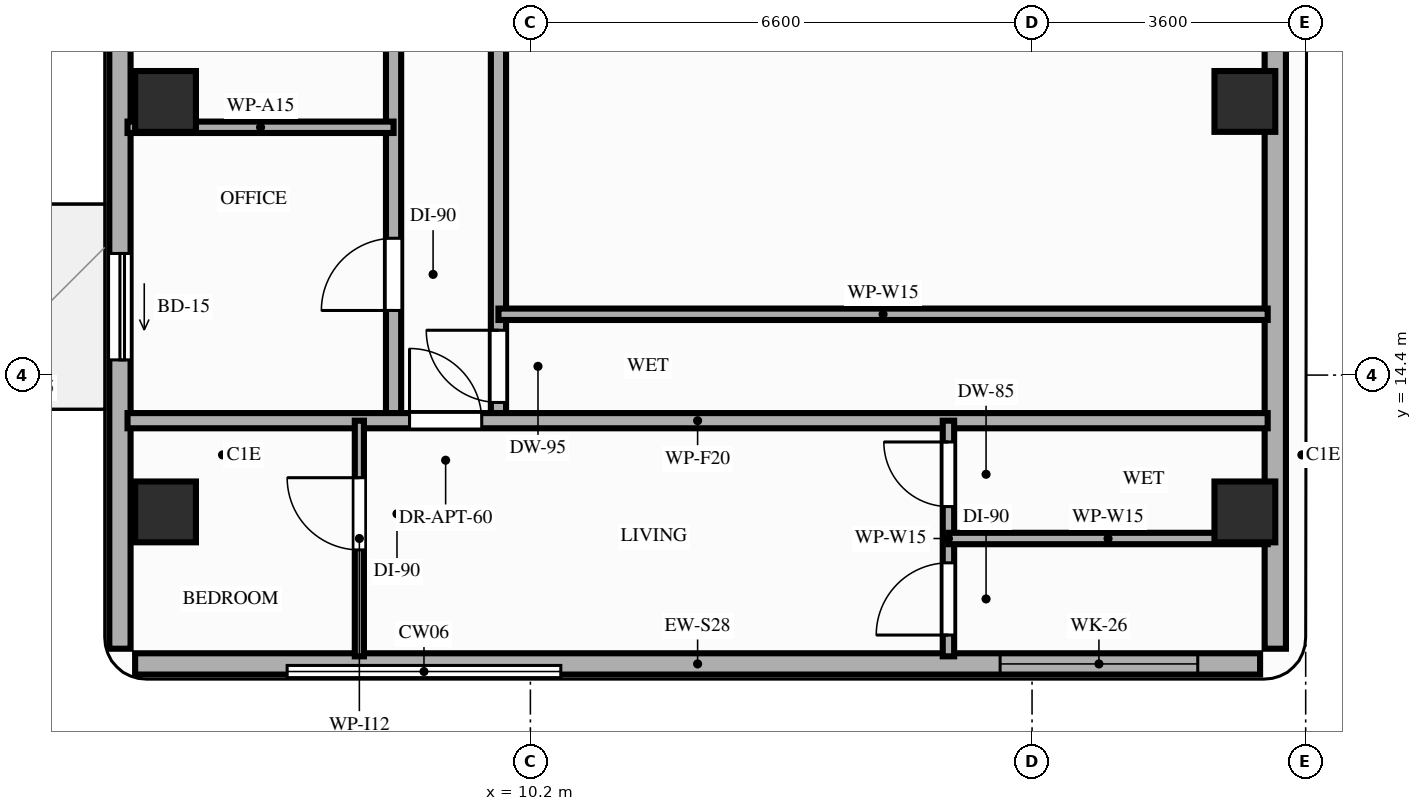
"""IFC4 building model, lengths in metres.
Left out: names, types, materials, properties, quantities, classifications, styles, units other than length and angle.
Written with IfcOpenShell. Run it as: python <this file> out.ifc"""

import sys

from ifc_helpers import new_model, si_unit, direction, frame, frame_2d, origin, origin_2d, place, context, subcontext, project, spatial, rectangle, extrude, element, fill, save


model = new_model("IFC4")
c1 = context("Model", 3, precision=1e-05, world=origin(), true_north=direction((0.0, 1.0)))
c2 = subcontext(c1, "Body", "Model", "MODEL_VIEW")
j1 = project(units=[si_unit("LENGTHUNIT", "METRE"), si_unit("PLANEANGLEUNIT", "RADIAN")], contexts=[c1])
p1 = place(None, origin())
s1 = spatial("IfcSite", under=j1, at=p1, CompositionType="ELEMENT")
p2 = place(p1, origin())
s2 = spatial("IfcBuilding", under=s1, at=p2, CompositionType="ELEMENT")
p3 = place(p2, frame((0.0, 0.0, 244.0)))
s3 = spatial("IfcBuildingStorey", under=s2, at=p3, CompositionType="ELEMENT", Elevation=244.0)
for number, where, z_axis, x_axis in (
    (1, (5.4, 12.6, 0.0), (0.0, 0.0, 1.0), (1.0, 0.0, 0.0)),
    (2, (19.6, 12.6, 0.0), (0.0, 0.0, 1.0), (1.0, 0.0, 0.0)),
    (3, (5.4, 18.0, 0.0), (0.0, 0.0, 1.0), (1.0, 0.0, 0.0)),
    (4, (19.6, 18.0, 0.0), (0.0, 0.0, 1.0), (1.0, 0.0, 0.0)),
):
    element("IfcColumn", number, at=place(p3, frame(where, z_axis=z_axis, x_axis=x_axis)), inside=s3, PredefinedType="COLUMN", context=c2, shape_type="SweptSolid", body=[
        extrude(rectangle(XDim=0.8, YDim=0.8, at=origin_2d()), origin(), (0.0, 0.0, 1.0), 3.2),
    ])
p4 = place(p3, frame((5.0, 10.6, 0.0), z_axis=(0.0, 0.0, 1.0), x_axis=(1.0, 0.0, 0.0)))
e5 = element("IfcWall", 5, at=p4, inside=s3, PredefinedType="STANDARD", context=c2, shape_type="SweptSolid", body=[
    extrude(rectangle(XDim=14.8, YDim=0.28, at=frame_2d((7.4, 0.0))), origin(), (0.0, 0.0, 1.0), 3.02),
])
p5 = place(p4, frame((11.38, 0.0, 0.85)))
e6 = element("IfcOpeningElement", 6, at=p5, cuts=e5, PredefinedType="OPENING", context=c2, shape_type="SweptSolid", body=[
    extrude(rectangle(XDim=2.6, YDim=1.92, at=frame_2d((1.3, 0.96))), frame((0.0, 0.15, 0.0), z_axis=(0.0, -1.0, 0.0), x_axis=(1.0, 0.0, 0.0)), (0.0, 0.0, 1.0), 0.3),
])
p6 = place(p3, frame((4.8, 42.1, 0.0), z_axis=(0.0, 0.0, 1.0), x_axis=(0.0, -1.0, 0.0)))
e7 = element("IfcWall", 7, at=p6, inside=s3, PredefinedType="STANDARD", context=c2, shape_type="SweptSolid", body=[
    extrude(rectangle(XDim=31.3, YDim=0.28, at=frame_2d((15.65, 0.0))), origin(), (0.0, 0.0, 1.0), 2.71),
])
p7 = place(p6, frame((26.1, 0.0, 0.0)))
e8 = element("IfcOpeningElement", 8, at=p7, cuts=e7, PredefinedType="OPENING", context=c2, shape_type="SweptSolid", body=[
    extrude(rectangle(XDim=1.4, YDim=2.1, at=frame_2d((0.7, 1.05))), frame((0.0, 0.15, 0.0), z_axis=(0.0, -1.0, 0.0), x_axis=(1.0, 0.0, 0.0)), (0.0, 0.0, 1.0), 0.3),
])
p8 = place(p6, frame((20.1, 0.0, 0.85)))
e9 = element("IfcOpeningElement", 9, at=p8, cuts=e7, PredefinedType="OPENING", context=c2, shape_type="SweptSolid", body=[
    extrude(rectangle(XDim=2.6, YDim=1.61, at=frame_2d((1.3, 0.805))), frame((0.0, 0.15, 0.0), z_axis=(0.0, -1.0, 0.0), x_axis=(1.0, 0.0, 0.0)), (0.0, 0.0, 1.0), 0.3),
])
p9 = place(p6, frame((9.5, 0.0, 0.85)))
e10 = element("IfcOpeningElement", 10, at=p9, cuts=e7, PredefinedType="OPENING", context=c2, shape_type="SweptSolid", body=[
    extrude(rectangle(XDim=2.6, YDim=1.61, at=frame_2d((1.3, 0.805))), frame((0.0, 0.15, 0.0), z_axis=(0.0, -1.0, 0.0), x_axis=(1.0, 0.0, 0.0)), (0.0, 0.0, 1.0), 0.3),
])
p10 = place(p6, frame((3.4, 0.0, 0.85)))
e11 = element("IfcOpeningElement", 11, at=p10, cuts=e7, PredefinedType="OPENING", context=c2, shape_type="SweptSolid", body=[
    extrude(rectangle(XDim=2.6, YDim=1.61, at=frame_2d((1.3, 0.805))), frame((0.0, 0.15, 0.0), z_axis=(0.0, -1.0, 0.0), x_axis=(1.0, 0.0, 0.0)), (0.0, 0.0, 1.0), 0.3),
])
p11 = place(p3, frame((20.0, 10.8, 0.0), z_axis=(0.0, 0.0, 1.0), x_axis=(0.0, 1.0, 0.0)))
e12 = element("IfcWall", 12, at=p11, inside=s3, PredefinedType="STANDARD", context=c2, shape_type="SweptSolid", body=[
    extrude(rectangle(XDim=21.55, YDim=0.28, at=frame_2d((10.775, 0.0))), origin(), (0.0, 0.0, 1.0), 2.56),
])
p12 = place(p11, frame((8.6, 0.0, 0.85)))
e13 = element("IfcOpeningElement", 13, at=p12, cuts=e12, PredefinedType="OPENING", context=c2, shape_type="SweptSolid", body=[
    extrude(rectangle(XDim=2.6, YDim=1.46, at=frame_2d((1.3, 0.73))), frame((0.0, 0.15, 0.0), z_axis=(0.0, -1.0, 0.0), x_axis=(1.0, 0.0, 0.0)), (0.0, 0.0, 1.0), 0.3),
])
p13 = place(p3, frame((8.4, 13.8, 0.0), z_axis=(0.0, 0.0, 1.0), x_axis=(0.0, 1.0, 0.0)))
e14 = element("IfcWall", 14, at=p13, inside=s3, PredefinedType="PARTITIONING", context=c2, shape_type="SweptSolid", body=[
    extrude(rectangle(XDim=14.3, YDim=0.2, at=frame_2d((7.15, 0.0))), origin(), (0.0, 0.0, 1.0), 2.56),
])
p14 = place(p13, frame((1.45, 0.0, 0.0)))
e15 = element("IfcOpeningElement", 15, at=p14, cuts=e14, PredefinedType="OPENING", context=c2, shape_type="SweptSolid", body=[
    extrude(rectangle(XDim=0.95, YDim=2.15, at=frame_2d((0.475, 1.075))), frame((0.0, 0.11, 0.0), z_axis=(0.0, -1.0, 0.0), x_axis=(1.0, 0.0, 0.0)), (0.0, 0.0, 1.0), 0.22),
])
p15 = place(p13, frame((5.81, 0.0, 0.0)))
e16 = element("IfcOpeningElement", 16, at=p15, cuts=e14, PredefinedType="OPENING", context=c2, shape_type="SweptSolid", body=[
    extrude(rectangle(XDim=0.95, YDim=2.15, at=frame_2d((0.475, 1.075))), frame((0.0, 0.11, 0.0), z_axis=(0.0, -1.0, 0.0), x_axis=(1.0, 0.0, 0.0)), (0.0, 0.0, 1.0), 0.22),
])
p16 = place(p13, frame((11.03, 0.0, 0.0)))
e17 = element("IfcOpeningElement", 17, at=p16, cuts=e14, PredefinedType="OPENING", context=c2, shape_type="SweptSolid", body=[
    extrude(rectangle(XDim=0.95, YDim=2.15, at=frame_2d((0.475, 1.075))), frame((0.0, 0.11, 0.0), z_axis=(0.0, -1.0, 0.0), x_axis=(1.0, 0.0, 0.0)), (0.0, 0.0, 1.0), 0.22),
])
p17 = place(p3, frame((9.78, 13.8, 0.0), z_axis=(0.0, 0.0, 1.0), x_axis=(0.0, 1.0, 0.0)))
e18 = element("IfcWall", 18, at=p17, inside=s3, PredefinedType="PARTITIONING", context=c2, shape_type="SweptSolid", body=[
    extrude(rectangle(XDim=14.3, YDim=0.2, at=frame_2d((7.15, 0.0))), origin(), (0.0, 0.0, 1.0), 2.56),
])
p18 = place(p17, frame((0.24, 0.0, 0.0)))
e19 = element("IfcOpeningElement", 19, at=p18, cuts=e18, PredefinedType="OPENING", context=c2, shape_type="SweptSolid", body=[
    extrude(rectangle(XDim=0.95, YDim=2.1, at=frame_2d((0.475, 1.05))), frame((0.0, 0.11, 0.0), z_axis=(0.0, -1.0, 0.0), x_axis=(1.0, 0.0, 0.0)), (0.0, 0.0, 1.0), 0.22),
])
p19 = place(p17, frame((4.98, 0.0, 0.0)))
e20 = element("IfcOpeningElement", 20, at=p19, cuts=e18, PredefinedType="OPENING", context=c2, shape_type="SweptSolid", body=[
    extrude(rectangle(XDim=0.95, YDim=2.15, at=frame_2d((0.475, 1.075))), frame((0.0, 0.11, 0.0), z_axis=(0.0, -1.0, 0.0), x_axis=(1.0, 0.0, 0.0)), (0.0, 0.0, 1.0), 0.22),
])
p20 = place(p17, frame((11.43, 0.0, 0.0)))
e21 = element("IfcOpeningElement", 21, at=p20, cuts=e18, PredefinedType="OPENING", context=c2, shape_type="SweptSolid", body=[
    extrude(rectangle(XDim=0.95, YDim=2.15, at=frame_2d((0.475, 1.075))), frame((0.0, 0.11, 0.0), z_axis=(0.0, -1.0, 0.0), x_axis=(1.0, 0.0, 0.0)), (0.0, 0.0, 1.0), 0.22),
])
p21 = place(p3, frame((4.9, 13.8, 0.0), z_axis=(0.0, 0.0, 1.0), x_axis=(1.0, 0.0, 0.0)))
e22 = element("IfcWall", 22, at=p21, inside=s3, PredefinedType="PARTITIONING", context=c2, shape_type="SweptSolid", body=[
    extrude(rectangle(XDim=15.0, YDim=0.2, at=frame_2d((7.5, 0.0))), origin(), (0.0, 0.0, 1.0), 2.56),
])
p22 = place(p21, frame((3.71, 0.0, 0.0)))
e23 = element("IfcOpeningElement", 23, at=p22, cuts=e22, PredefinedType="OPENING", context=c2, shape_type="SweptSolid", body=[
    extrude(rectangle(XDim=0.95, YDim=2.15, at=frame_2d((0.475, 1.075))), frame((0.0, 0.11, 0.0), z_axis=(0.0, -1.0, 0.0), x_axis=(1.0, 0.0, 0.0)), (0.0, 0.0, 1.0), 0.22),
])
p23 = place(p3, frame((7.95, 10.7, 0.0), z_axis=(0.0, 0.0, 1.0), x_axis=(0.0, 1.0, 0.0)))
e24 = element("IfcWall", 24, at=p23, inside=s3, PredefinedType="PARTITIONING", context=c2, shape_type="SweptSolid", body=[
    extrude(rectangle(XDim=3.1, YDim=0.12, at=frame_2d((1.55, 0.0))), origin(), (0.0, 0.0, 1.0), 2.56),
])
p24 = place(p23, frame((1.4, 0.0, 0.0)))
e25 = element("IfcOpeningElement", 25, at=p24, cuts=e24, PredefinedType="OPENING", context=c2, shape_type="SweptSolid", body=[
    extrude(rectangle(XDim=0.95, YDim=2.15, at=frame_2d((0.475, 1.075))), frame((0.0, 0.07, 0.0), z_axis=(0.0, -1.0, 0.0), x_axis=(1.0, 0.0, 0.0)), (0.0, 0.0, 1.0), 0.14),
])
p25 = place(p3, frame((15.7, 10.7, 0.0), z_axis=(0.0, 0.0, 1.0), x_axis=(0.0, 1.0, 0.0)))
e26 = element("IfcWall", 26, at=p25, inside=s3, PredefinedType="PARTITIONING", context=c2, shape_type="SweptSolid", body=[
    extrude(rectangle(XDim=3.1, YDim=0.15, at=frame_2d((1.55, 0.0))), origin(), (0.0, 0.0, 1.0), 2.56),
])
p26 = place(p25, frame((0.28, 0.0, 0.0)))
e27 = element("IfcOpeningElement", 27, at=p26, cuts=e26, PredefinedType="OPENING", context=c2, shape_type="SweptSolid", body=[
    extrude(rectangle(XDim=0.95, YDim=2.15, at=frame_2d((0.475, 1.075))), frame((0.0, 0.085, 0.0), z_axis=(0.0, -1.0, 0.0), x_axis=(1.0, 0.0, 0.0)), (0.0, 0.0, 1.0), 0.17),
])
p27 = place(p25, frame((1.97, 0.0, 0.0)))
e28 = element("IfcOpeningElement", 28, at=p27, cuts=e26, PredefinedType="OPENING", context=c2, shape_type="SweptSolid", body=[
    extrude(rectangle(XDim=0.85, YDim=2.1, at=frame_2d((0.425, 1.05))), frame((0.0, 0.085, 0.0), z_axis=(0.0, -1.0, 0.0), x_axis=(1.0, 0.0, 0.0)), (0.0, 0.0, 1.0), 0.17),
])
p28 = place(p3, frame((15.7, 12.25, 0.0), z_axis=(0.0, 0.0, 1.0), x_axis=(1.0, 0.0, 0.0)))
e29 = element("IfcWall", 29, at=p28, inside=s3, PredefinedType="PARTITIONING", context=c2, shape_type="SweptSolid", body=[
    extrude(rectangle(XDim=4.2, YDim=0.15, at=frame_2d((2.1, 0.0))), origin(), (0.0, 0.0, 1.0), 2.56),
])
p29 = place(p3, frame((4.9, 17.66, 0.0), z_axis=(0.0, 0.0, 1.0), x_axis=(1.0, 0.0, 0.0)))
e30 = element("IfcWall", 30, at=p29, inside=s3, PredefinedType="PARTITIONING", context=c2, shape_type="SweptSolid", body=[
    extrude(rectangle(XDim=3.5, YDim=0.15, at=frame_2d((1.75, 0.0))), origin(), (0.0, 0.0, 1.0), 2.56),
])
p30 = place(p3, frame((9.78, 15.2, 0.0), z_axis=(0.0, 0.0, 1.0), x_axis=(1.0, 0.0, 0.0)))
e31 = element("IfcWall", 31, at=p30, inside=s3, PredefinedType="PARTITIONING", context=c2, shape_type="SweptSolid", body=[
    extrude(rectangle(XDim=10.12, YDim=0.15, at=frame_2d((5.06, 0.0))), origin(), (0.0, 0.0, 1.0), 2.56),
])
p31 = place(p7, origin())
e32 = element("IfcDoor", 32, at=p31, inside=s3, OperationType="SLIDING_TO_RIGHT", PredefinedType="DOOR", context=c2, shape_type="SweptSolid", body=[
    extrude(rectangle(XDim=1.4, YDim=2.1, at=frame_2d((0.7, 1.05))), frame((0.0, 0.025, 0.0), z_axis=(0.0, -1.0, 0.0), x_axis=(1.0, 0.0, 0.0)), (0.0, 0.0, 1.0), 0.05),
])
fill(e8, e32)
p32 = place(p5, origin())
e33 = element("IfcWindow", 33, at=p32, inside=s3, PartitioningType="SINGLE_PANEL", PredefinedType="WINDOW", context=c2, shape_type="SweptSolid", body=[
    extrude(rectangle(XDim=2.6, YDim=1.92, at=frame_2d((1.3, 0.96))), frame((0.0, 0.03, 0.0), z_axis=(0.0, -1.0, 0.0), x_axis=(1.0, 0.0, 0.0)), (0.0, 0.0, 1.0), 0.06),
])
fill(e6, e33)
p33 = place(p22, origin())
e34 = element("IfcDoor", 34, at=p33, inside=s3, OperationType="SINGLE_SWING_LEFT", PredefinedType="DOOR", context=c2, shape_type="SweptSolid", body=[
    extrude(rectangle(XDim=0.95, YDim=2.15, at=frame_2d((0.475, 1.075))), frame((0.0, 0.025, 0.0), z_axis=(0.0, -1.0, 0.0), x_axis=(1.0, 0.0, 0.0)), (0.0, 0.0, 1.0), 0.05),
])
fill(e23, e34)
p34 = place(p24, origin())
e35 = element("IfcDoor", 35, at=p34, inside=s3, OperationType="SINGLE_SWING_RIGHT", PredefinedType="DOOR", context=c2, shape_type="SweptSolid", body=[
    extrude(rectangle(XDim=0.95, YDim=2.15, at=frame_2d((0.475, 1.075))), frame((0.0, 0.025, 0.0), z_axis=(0.0, -1.0, 0.0), x_axis=(1.0, 0.0, 0.0)), (0.0, 0.0, 1.0), 0.05),
])
fill(e25, e35)
p35 = place(p26, origin())
e36 = element("IfcDoor", 36, at=p35, inside=s3, OperationType="SINGLE_SWING_LEFT", PredefinedType="DOOR", context=c2, shape_type="SweptSolid", body=[
    extrude(rectangle(XDim=0.95, YDim=2.15, at=frame_2d((0.475, 1.075))), frame((0.0, 0.025, 0.0), z_axis=(0.0, -1.0, 0.0), x_axis=(1.0, 0.0, 0.0)), (0.0, 0.0, 1.0), 0.05),
])
fill(e27, e36)
p36 = place(p27, origin())
e37 = element("IfcDoor", 37, at=p36, inside=s3, OperationType="SINGLE_SWING_RIGHT", PredefinedType="DOOR", context=c2, shape_type="SweptSolid", body=[
    extrude(rectangle(XDim=0.85, YDim=2.1, at=frame_2d((0.425, 1.05))), frame((0.0, 0.025, 0.0), z_axis=(0.0, -1.0, 0.0), x_axis=(1.0, 0.0, 0.0)), (0.0, 0.0, 1.0), 0.05),
])
fill(e28, e37)
p37 = place(p14, origin())
e38 = element("IfcDoor", 38, at=p37, inside=s3, OperationType="SINGLE_SWING_LEFT", PredefinedType="DOOR", context=c2, shape_type="SweptSolid", body=[
    extrude(rectangle(XDim=0.95, YDim=2.15, at=frame_2d((0.475, 1.075))), frame((0.0, 0.025, 0.0), z_axis=(0.0, -1.0, 0.0), x_axis=(1.0, 0.0, 0.0)), (0.0, 0.0, 1.0), 0.05),
])
fill(e15, e38)
p38 = place(p18, origin())
e39 = element("IfcDoor", 39, at=p38, inside=s3, OperationType="SINGLE_SWING_RIGHT", PredefinedType="DOOR", context=c2, shape_type="SweptSolid", body=[
    extrude(rectangle(XDim=0.95, YDim=2.1, at=frame_2d((0.475, 1.05))), frame((0.0, 0.025, 0.0), z_axis=(0.0, -1.0, 0.0), x_axis=(1.0, 0.0, 0.0)), (0.0, 0.0, 1.0), 0.05),
])
fill(e19, e39)
save(model, sys.argv[1])
